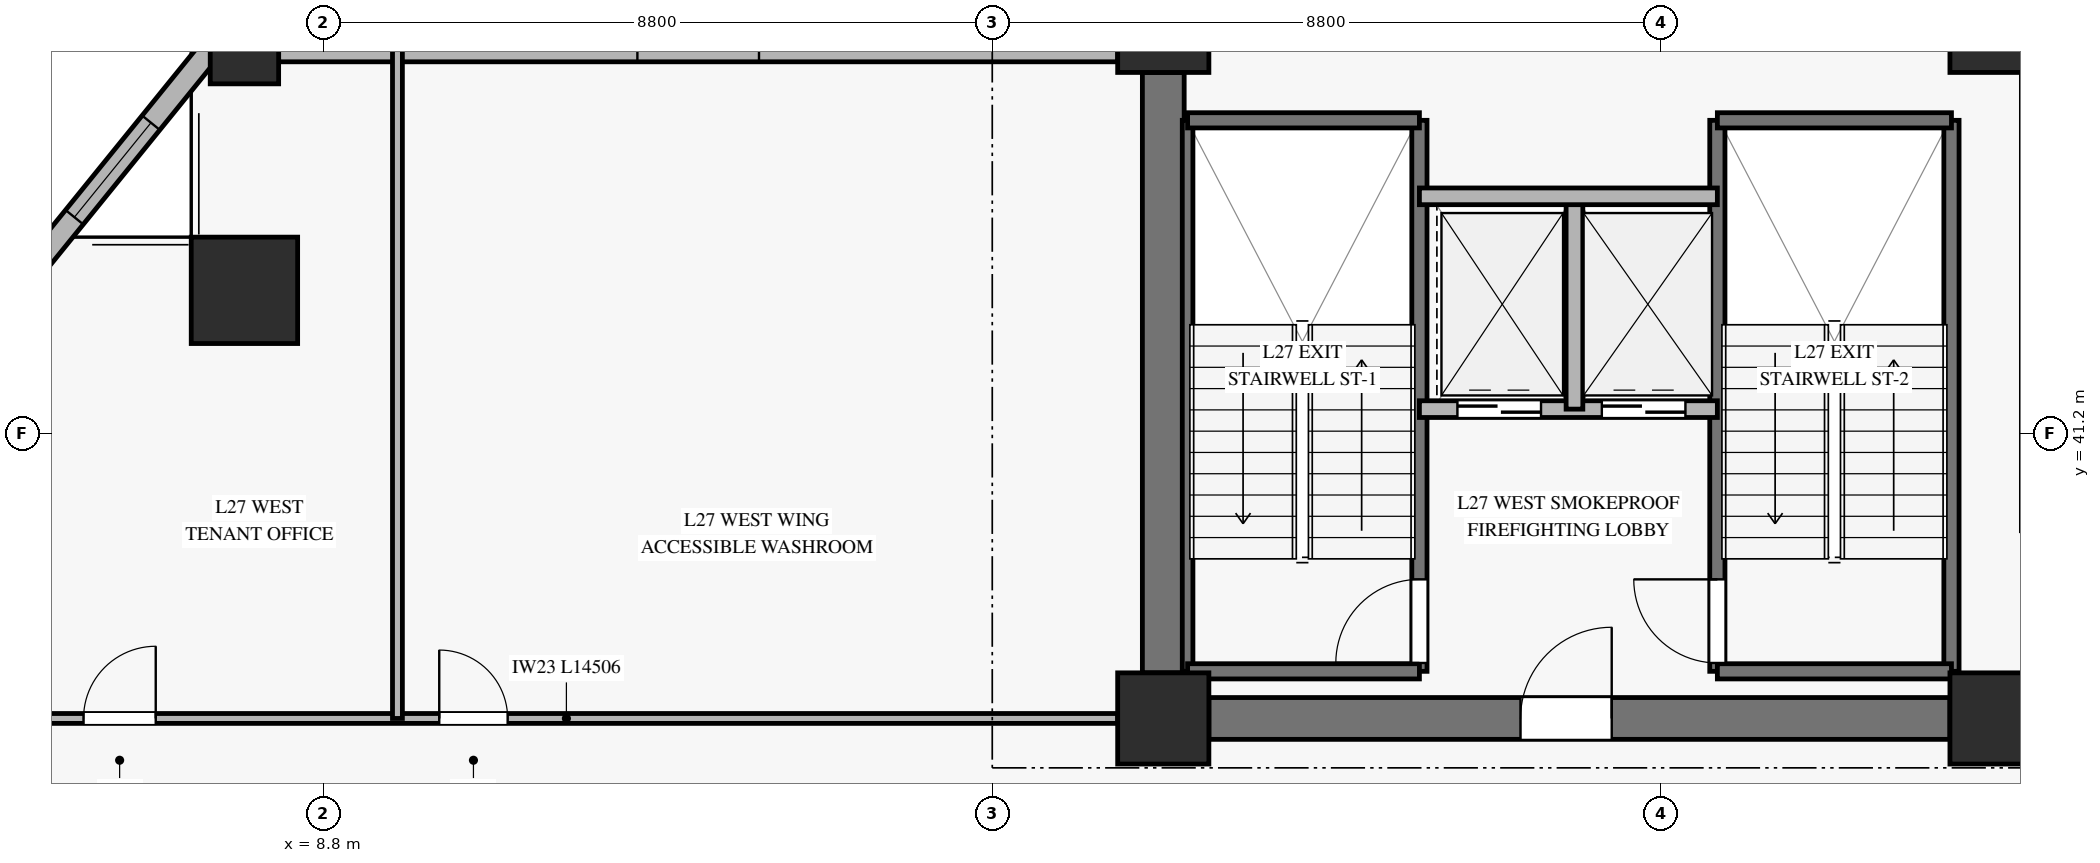
"""IFC4 building model, lengths in metres.
Left out: names, types, materials, properties, quantities, classifications, styles, units other than length and angle.
Written with IfcOpenShell. Run it as: python <this file> out.ifc"""

import sys

from ifc_helpers import new_model, si_unit, direction, frame, frame_2d, origin, origin_2d, place, context, subcontext, project, spatial, rectangle, hollow_rectangle, extrude, source, transform, mapped, element, fill, save


model = new_model("IFC4")
c1 = context("Model", 3, precision=1e-05, world=origin(), true_north=direction((0.0, 1.0)))
c2 = subcontext(c1, "Body", "Model", "MODEL_VIEW")
j1 = project(units=[si_unit("LENGTHUNIT", "METRE"), si_unit("PLANEANGLEUNIT", "RADIAN")], contexts=[c1])
p1 = place(None, origin())
s1 = spatial("IfcSite", under=j1, at=p1, CompositionType="ELEMENT")
p2 = place(p1, origin())
s2 = spatial("IfcBuilding", under=s1, at=p2, CompositionType="ELEMENT")
p3 = place(p2, frame((0.0, 0.0, 111.4)))
s3 = spatial("IfcBuildingStorey", under=s2, at=p3, CompositionType="ELEMENT", Elevation=111.4)
m1 = source(origin(), c2, "Body", "SweptSolid", [
    extrude(rectangle(XDim=1.2, YDim=1.2, at=origin_2d()), origin(), (0.0, 0.0, 1.0), 3.68),
])
for number, where, z_axis, x_axis in (
    (1, (19.85, 37.45, 0.0), (0.0, 0.0, 1.0), (1.0, 0.0, 0.0)),
    (2, (19.85, 46.55, 0.0), (0.0, 0.0, 1.0), (1.0, 0.0, 0.0)),
    (3, (30.8, 37.45, 0.0), (0.0, 0.0, 1.0), (1.0, 0.0, 0.0)),
    (4, (30.8, 46.55, 0.0), (0.0, 0.0, 1.0), (1.0, 0.0, 0.0)),
):
    element("IfcColumn", number, at=place(p3, frame(where, z_axis=z_axis, x_axis=x_axis)), inside=s3, PredefinedType="PILASTER", context=c2, shape_type="MappedRepresentation", body=[
        mapped(m1, transform((0.0, 0.0, 0.0), x_axis=(1.0, 0.0, 0.0), y_axis=(0.0, 1.0, 0.0), z_axis=(0.0, 0.0, 1.0), scale=1.0)),
    ])
p4 = place(p3, frame((20.45, 37.45, 0.0), z_axis=(0.0, 0.0, 1.0), x_axis=(1.0, 0.0, 0.0)))
e5 = element("IfcWall", 5, at=p4, inside=s3, PredefinedType="SHEAR", context=c2, shape_type="SweptSolid", body=[
    extrude(rectangle(XDim=9.75, YDim=0.55, at=frame_2d((4.875, 0.0))), origin(), (0.0, 0.0, 1.0), 3.68),
])
p5 = place(p4, frame((4.1, 0.0, 0.0)))
e6 = element("IfcOpeningElement", 6, at=p5, cuts=e5, PredefinedType="OPENING", context=c2, shape_type="SweptSolid", body=[
    extrude(rectangle(XDim=1.2, YDim=2.15, at=frame_2d((0.6, 1.075))), frame((0.0, 0.285, 0.0), z_axis=(0.0, -1.0, 0.0), x_axis=(1.0, 0.0, 0.0)), (0.0, 0.0, 1.0), 0.57),
])
p6 = place(p3, frame((19.85, 38.05, 0.0), z_axis=(0.0, 0.0, 1.0), x_axis=(0.0, 1.0, 0.0)))
e7 = element("IfcWall", 7, at=p6, inside=s3, PredefinedType="SHEAR", context=c2, shape_type="SweptSolid", body=[
    extrude(rectangle(XDim=7.9, YDim=0.55, at=frame_2d((3.95, 0.0))), origin(), (0.0, 0.0, 1.0), 3.68),
])
m2 = source(origin(), c2, "Body", "SweptSolid", [
    extrude(hollow_rectangle(XDim=1.4, YDim=1.4, WallThickness=0.065, at=origin_2d()), origin(), (0.0, 0.0, 1.0), 3.68),
])
p7 = place(p3, frame((7.761, 43.083, 0.0), z_axis=(0.0, 0.0, 1.0), x_axis=(1.0, 0.0, 0.0)))
e8 = element("IfcColumn", 8, at=p7, inside=s3, PredefinedType="COLUMN", context=c2, shape_type="MappedRepresentation", body=[
    mapped(m2, transform((0.0, 0.0, 0.0), x_axis=(1.0, 0.0, 0.0), y_axis=(0.0, 1.0, 0.0), z_axis=(0.0, 0.0, 1.0), scale=1.0)),
])
m3 = source(origin(), c2, "Body", "SweptSolid", [
    extrude(hollow_rectangle(XDim=0.9, YDim=0.9, WallThickness=0.04, at=origin_2d()), origin(), (0.0, 0.0, 1.0), 3.68),
])
p8 = place(p3, frame((7.761, 46.25, 0.0), z_axis=(0.0, 0.0, 1.0), x_axis=(1.0, 0.0, 0.0)))
e9 = element("IfcColumn", 9, at=p8, inside=s3, PredefinedType="COLUMN", context=c2, shape_type="MappedRepresentation", body=[
    mapped(m3, transform((0.0, 0.0, 0.0), x_axis=(1.0, 0.0, 0.0), y_axis=(0.0, 1.0, 0.0), z_axis=(0.0, 0.0, 1.0), scale=1.0)),
])
p9 = place(p3, frame((8.211, 46.25, 0.0), z_axis=(0.0, 0.0, 1.0), x_axis=(1.0, 0.0, 0.0)))
e10 = element("IfcWall", 10, at=p9, inside=s3, PredefinedType="SOLIDWALL", context=c2, shape_type="SweptSolid", body=[
    extrude(rectangle(XDim=11.039, YDim=0.32, at=frame_2d((5.52, 0.0))), origin(), (0.0, 0.0, 1.0), 3.16),
])
p10 = place(p9, frame((4.72, 0.0, 0.45)))
e11 = element("IfcOpeningElement", 11, at=p10, cuts=e10, PredefinedType="OPENING", context=c2, shape_type="SweptSolid", body=[
    extrude(rectangle(XDim=1.6, YDim=2.0, at=frame_2d((0.8, 1.0))), frame((0.0, 0.17, 0.0), z_axis=(0.0, -1.0, 0.0), x_axis=(1.0, 0.0, 0.0)), (0.0, 0.0, 1.0), 0.34),
])
p11 = place(p3, frame((7.311, 46.25, 0.0), z_axis=(0.0, 0.0, 1.0), x_axis=(-0.629699415949, -0.776838880047, 0.0)))
e12 = element("IfcWall", 12, at=p11, inside=s3, PredefinedType="SOLIDWALL", context=c2, shape_type="SweptSolid", body=[
    extrude(rectangle(XDim=4.077, YDim=0.3, at=frame_2d((2.038, 0.0))), origin(), (0.0, 0.0, 1.0), 3.16),
])
p12 = place(p11, frame((1.238, 0.0, 0.45)))
e13 = element("IfcOpeningElement", 13, at=p12, cuts=e12, PredefinedType="OPENING", context=c2, shape_type="SweptSolid", body=[
    extrude(rectangle(XDim=1.6, YDim=2.0, at=frame_2d((0.8, 1.0))), frame((0.0, 0.16, 0.0), z_axis=(0.0, -1.0, 0.0), x_axis=(1.0, 0.0, 0.0)), (0.0, 0.0, 1.0), 0.32),
])
p13 = place(p3, frame((20.17, 38.07, 0.0), z_axis=(0.0, 0.0, 1.0), x_axis=(0.0, 1.0, 0.0)))
e14 = element("IfcWall", 14, at=p13, inside=s3, PredefinedType="SOLIDWALL", context=c2, shape_type="SweptSolid", body=[
    extrude(rectangle(XDim=7.25, YDim=0.14, at=frame_2d((3.625, 0.0))), origin(), (0.0, 0.0, 1.0), 3.9),
])
p14 = place(p3, frame((23.22, 38.07, 0.0), z_axis=(0.0, 0.0, 1.0), x_axis=(0.0, 1.0, 0.0)))
e15 = element("IfcWall", 15, at=p14, inside=s3, PredefinedType="SOLIDWALL", context=c2, shape_type="SweptSolid", body=[
    extrude(rectangle(XDim=7.25, YDim=0.2, at=frame_2d((3.625, 0.0))), origin(), (0.0, 0.0, 1.0), 3.9),
])
p15 = place(p14, frame((0.11, 0.0, 0.0)))
e16 = element("IfcOpeningElement", 16, at=p15, cuts=e15, PredefinedType="OPENING", context=c2, shape_type="SweptSolid", body=[
    extrude(rectangle(XDim=1.1, YDim=2.15, at=frame_2d((0.55, 1.075))), frame((0.0, 0.11, 0.0), z_axis=(0.0, -1.0, 0.0), x_axis=(1.0, 0.0, 0.0)), (0.0, 0.0, 1.0), 0.22),
])
for number, where, z_axis, x_axis in (
    (17, (20.17, 45.32, 0.0), (0.0, 0.0, 1.0), (1.0, 0.0, 0.0)),
    (18, (20.17, 38.07, 0.0), (0.0, 0.0, 1.0), (1.0, 0.0, 0.0)),
):
    element("IfcWall", number, at=place(p3, frame(where, z_axis=z_axis, x_axis=x_axis)), inside=s3, PredefinedType="SOLIDWALL", context=c2, shape_type="SweptSolid", body=[
        extrude(rectangle(XDim=3.05, YDim=0.2, at=frame_2d((1.525, 0.0))), origin(), (0.0, 0.0, 1.0), 3.9),
    ])
p16 = place(p3, frame((27.14, 38.07, 0.0), z_axis=(0.0, 0.0, 1.0), x_axis=(0.0, 1.0, 0.0)))
e19 = element("IfcWall", 19, at=p16, inside=s3, PredefinedType="SOLIDWALL", context=c2, shape_type="SweptSolid", body=[
    extrude(rectangle(XDim=7.25, YDim=0.2, at=frame_2d((3.625, 0.0))), origin(), (0.0, 0.0, 1.0), 3.9),
])
p17 = place(p16, frame((0.11, 0.0, 0.0)))
e20 = element("IfcOpeningElement", 20, at=p17, cuts=e19, PredefinedType="OPENING", context=c2, shape_type="SweptSolid", body=[
    extrude(rectangle(XDim=1.1, YDim=2.15, at=frame_2d((0.55, 1.075))), frame((0.0, 0.11, 0.0), z_axis=(0.0, -1.0, 0.0), x_axis=(1.0, 0.0, 0.0)), (0.0, 0.0, 1.0), 0.22),
])
p18 = place(p3, frame((30.22, 38.07, 0.0), z_axis=(0.0, 0.0, 1.0), x_axis=(0.0, 1.0, 0.0)))
e21 = element("IfcWall", 21, at=p18, inside=s3, PredefinedType="SOLIDWALL", context=c2, shape_type="SweptSolid", body=[
    extrude(rectangle(XDim=7.25, YDim=0.2, at=frame_2d((3.625, 0.0))), origin(), (0.0, 0.0, 1.0), 3.9),
])
for number, where, z_axis, x_axis in (
    (22, (27.14, 45.32, 0.0), (0.0, 0.0, 1.0), (1.0, 0.0, 0.0)),
    (23, (27.14, 38.07, 0.0), (0.0, 0.0, 1.0), (1.0, 0.0, 0.0)),
):
    element("IfcWall", number, at=place(p3, frame(where, z_axis=z_axis, x_axis=x_axis)), inside=s3, PredefinedType="SOLIDWALL", context=c2, shape_type="SweptSolid", body=[
        extrude(rectangle(XDim=3.08, YDim=0.2, at=frame_2d((1.54, 0.0))), origin(), (0.0, 0.0, 1.0), 3.9),
    ])
p19 = place(p3, frame((23.22, 41.52, 0.0), z_axis=(0.0, 0.0, 1.0), x_axis=(1.0, 0.0, 0.0)))
e24 = element("IfcWall", 24, at=p19, inside=s3, PredefinedType="SOLIDWALL", context=c2, shape_type="SweptSolid", body=[
    extrude(rectangle(XDim=3.92, YDim=0.22, at=frame_2d((1.96, 0.0))), origin(), (0.0, 0.0, 1.0), 3.68),
])
p20 = place(p19, frame((0.5, 0.0, 0.0)))
e25 = element("IfcOpeningElement", 25, at=p20, cuts=e24, PredefinedType="OPENING", context=c2, shape_type="SweptSolid", body=[
    extrude(rectangle(XDim=1.1, YDim=2.2, at=frame_2d((0.55, 1.1))), frame((0.0, 0.12, 0.0), z_axis=(0.0, -1.0, 0.0), x_axis=(1.0, 0.0, 0.0)), (0.0, 0.0, 1.0), 0.24),
])
p21 = place(p19, frame((2.4, 0.0, 0.0)))
e26 = element("IfcOpeningElement", 26, at=p21, cuts=e24, PredefinedType="OPENING", context=c2, shape_type="SweptSolid", body=[
    extrude(rectangle(XDim=1.1, YDim=2.2, at=frame_2d((0.55, 1.1))), frame((0.0, 0.12, 0.0), z_axis=(0.0, -1.0, 0.0), x_axis=(1.0, 0.0, 0.0)), (0.0, 0.0, 1.0), 0.24),
])
p22 = place(p3, frame((25.26, 41.52, 0.0), z_axis=(0.0, 0.0, 1.0), x_axis=(0.0, 1.0, 0.0)))
e27 = element("IfcWall", 27, at=p22, inside=s3, PredefinedType="SOLIDWALL", context=c2, shape_type="SweptSolid", body=[
    extrude(rectangle(XDim=2.8, YDim=0.22, at=frame_2d((1.4, 0.0))), origin(), (0.0, 0.0, 1.0), 3.68),
])
p23 = place(p3, frame((23.22, 44.32, 0.0), z_axis=(0.0, 0.0, 1.0), x_axis=(1.0, 0.0, 0.0)))
e28 = element("IfcWall", 28, at=p23, inside=s3, PredefinedType="SOLIDWALL", context=c2, shape_type="SweptSolid", body=[
    extrude(rectangle(XDim=3.92, YDim=0.22, at=frame_2d((1.96, 0.0))), origin(), (0.0, 0.0, 1.0), 3.68),
])
p24 = place(p3, frame((4.744, 37.45, 0.0), z_axis=(0.0, 0.0, 1.0), x_axis=(1.0, 0.0, 0.0)))
e29 = element("IfcWall", 29, at=p24, inside=s3, PredefinedType="PARTITIONING", context=c2, shape_type="SweptSolid", body=[
    extrude(rectangle(XDim=14.506, YDim=0.13, at=frame_2d((7.253, 0.0))), origin(), (0.0, 0.0, 1.0), 3.165),
])
p25 = place(p24, frame((0.9, 0.0, 0.0)))
e30 = element("IfcOpeningElement", 30, at=p25, cuts=e29, PredefinedType="OPENING", context=c2, shape_type="SweptSolid", body=[
    extrude(rectangle(XDim=0.95, YDim=2.1, at=frame_2d((0.475, 1.05))), frame((0.0, 0.075, 0.0), z_axis=(0.0, -1.0, 0.0), x_axis=(1.0, 0.0, 0.0)), (0.0, 0.0, 1.0), 0.15),
])
p26 = place(p24, frame((5.58, 0.0, 0.0)))
e31 = element("IfcOpeningElement", 31, at=p26, cuts=e29, PredefinedType="OPENING", context=c2, shape_type="SweptSolid", body=[
    extrude(rectangle(XDim=0.9, YDim=2.1, at=frame_2d((0.45, 1.05))), frame((0.0, 0.075, 0.0), z_axis=(0.0, -1.0, 0.0), x_axis=(1.0, 0.0, 0.0)), (0.0, 0.0, 1.0), 0.15),
])
p27 = place(p3, frame((9.774, 37.45, 0.0), z_axis=(0.0, 0.0, 1.0), x_axis=(0.0, 1.0, 0.0)))
e32 = element("IfcWall", 32, at=p27, inside=s3, PredefinedType="PARTITIONING", context=c2, shape_type="SweptSolid", body=[
    extrude(rectangle(XDim=8.8, YDim=0.13, at=frame_2d((4.4, 0.0))), origin(), (0.0, 0.0, 1.0), 3.68),
])
m4 = source(origin(), c2, "Body", "SweptSolid", [
    extrude(rectangle(XDim=1.6, YDim=2.0, at=frame_2d((0.8, 1.0))), frame((0.0, 0.03, 0.0), z_axis=(0.0, -1.0, 0.0), x_axis=(1.0, 0.0, 0.0)), (0.0, 0.0, 1.0), 0.06),
])
p28 = place(p12, origin())
e33 = element("IfcWindow", 33, at=p28, inside=s3, PartitioningType="SINGLE_PANEL", PredefinedType="WINDOW", context=c2, shape_type="MappedRepresentation", body=[
    mapped(m4, transform((0.0, 0.0, 0.0), x_axis=(1.0, 0.0, 0.0), y_axis=(0.0, 1.0, 0.0), z_axis=(0.0, 0.0, 1.0), scale=1.0)),
])
fill(e13, e33)
m5 = source(origin(), c2, "Body", "SweptSolid", [
    extrude(rectangle(XDim=1.1, YDim=2.15, at=frame_2d((0.55, 1.075))), frame((0.0, 0.025, 0.0), z_axis=(0.0, -1.0, 0.0), x_axis=(1.0, 0.0, 0.0)), (0.0, 0.0, 1.0), 0.05),
])
p29 = place(p15, origin())
e34 = element("IfcDoor", 34, at=p29, inside=s3, OperationType="SINGLE_SWING_LEFT", PredefinedType="DOOR", context=c2, shape_type="MappedRepresentation", body=[
    mapped(m5, transform((0.0, 0.0, 0.0), x_axis=(1.0, 0.0, 0.0), y_axis=(0.0, 1.0, 0.0), z_axis=(0.0, 0.0, 1.0), scale=1.0)),
])
fill(e16, e34)
p30 = place(p17, origin())
e35 = element("IfcDoor", 35, at=p30, inside=s3, OperationType="SINGLE_SWING_RIGHT", PredefinedType="DOOR", context=c2, shape_type="MappedRepresentation", body=[
    mapped(m5, transform((0.0, 0.0, 0.0), x_axis=(1.0, 0.0, 0.0), y_axis=(0.0, 1.0, 0.0), z_axis=(0.0, 0.0, 1.0), scale=1.0)),
])
fill(e20, e35)
m6 = source(origin(), c2, "Body", "SweptSolid", [
    extrude(rectangle(XDim=1.1, YDim=2.2, at=frame_2d((0.55, 1.1))), frame((0.0, 0.025, 0.0), z_axis=(0.0, -1.0, 0.0), x_axis=(1.0, 0.0, 0.0)), (0.0, 0.0, 1.0), 0.05),
])
p31 = place(p20, origin())
e36 = element("IfcDoor", 36, at=p31, inside=s3, OperationType="SLIDING_TO_LEFT", PredefinedType="DOOR", context=c2, shape_type="MappedRepresentation", body=[
    mapped(m6, transform((0.0, 0.0, 0.0), x_axis=(1.0, 0.0, 0.0), y_axis=(0.0, 1.0, 0.0), z_axis=(0.0, 0.0, 1.0), scale=1.0)),
])
fill(e25, e36)
p32 = place(p21, origin())
e37 = element("IfcDoor", 37, at=p32, inside=s3, OperationType="SLIDING_TO_LEFT", PredefinedType="DOOR", context=c2, shape_type="MappedRepresentation", body=[
    mapped(m6, transform((0.0, 0.0, 0.0), x_axis=(1.0, 0.0, 0.0), y_axis=(0.0, 1.0, 0.0), z_axis=(0.0, 0.0, 1.0), scale=1.0)),
])
fill(e26, e37)
m7 = source(origin(), c2, "Body", "SweptSolid", [
    extrude(rectangle(XDim=1.2, YDim=2.15, at=frame_2d((0.6, 1.075))), frame((0.0, 0.025, 0.0), z_axis=(0.0, -1.0, 0.0), x_axis=(1.0, 0.0, 0.0)), (0.0, 0.0, 1.0), 0.05),
])
p33 = place(p5, origin())
e38 = element("IfcDoor", 38, at=p33, inside=s3, OperationType="SINGLE_SWING_RIGHT", PredefinedType="DOOR", context=c2, shape_type="MappedRepresentation", body=[
    mapped(m7, transform((0.0, 0.0, 0.0), x_axis=(1.0, 0.0, 0.0), y_axis=(0.0, 1.0, 0.0), z_axis=(0.0, 0.0, 1.0), scale=1.0)),
])
fill(e6, e38)
m8 = source(origin(), c2, "Body", "SweptSolid", [
    extrude(rectangle(XDim=0.95, YDim=2.1, at=frame_2d((0.475, 1.05))), frame((0.0, 0.025, 0.0), z_axis=(0.0, -1.0, 0.0), x_axis=(1.0, 0.0, 0.0)), (0.0, 0.0, 1.0), 0.05),
])
p34 = place(p25, origin())
e39 = element("IfcDoor", 39, at=p34, inside=s3, OperationType="SINGLE_SWING_RIGHT", PredefinedType="DOOR", context=c2, shape_type="MappedRepresentation", body=[
    mapped(m8, transform((0.0, 0.0, 0.0), x_axis=(1.0, 0.0, 0.0), y_axis=(0.0, 1.0, 0.0), z_axis=(0.0, 0.0, 1.0), scale=1.0)),
])
fill(e30, e39)
m9 = source(origin(), c2, "Body", "SweptSolid", [
    extrude(rectangle(XDim=0.9, YDim=2.1, at=frame_2d((0.45, 1.05))), frame((0.0, 0.025, 0.0), z_axis=(0.0, -1.0, 0.0), x_axis=(1.0, 0.0, 0.0)), (0.0, 0.0, 1.0), 0.05),
])
p35 = place(p26, origin())
e40 = element("IfcDoor", 40, at=p35, inside=s3, OperationType="SINGLE_SWING_LEFT", PredefinedType="DOOR", context=c2, shape_type="MappedRepresentation", body=[
    mapped(m9, transform((0.0, 0.0, 0.0), x_axis=(1.0, 0.0, 0.0), y_axis=(0.0, 1.0, 0.0), z_axis=(0.0, 0.0, 1.0), scale=1.0)),
])
fill(e31, e40)
save(model, sys.argv[1])
